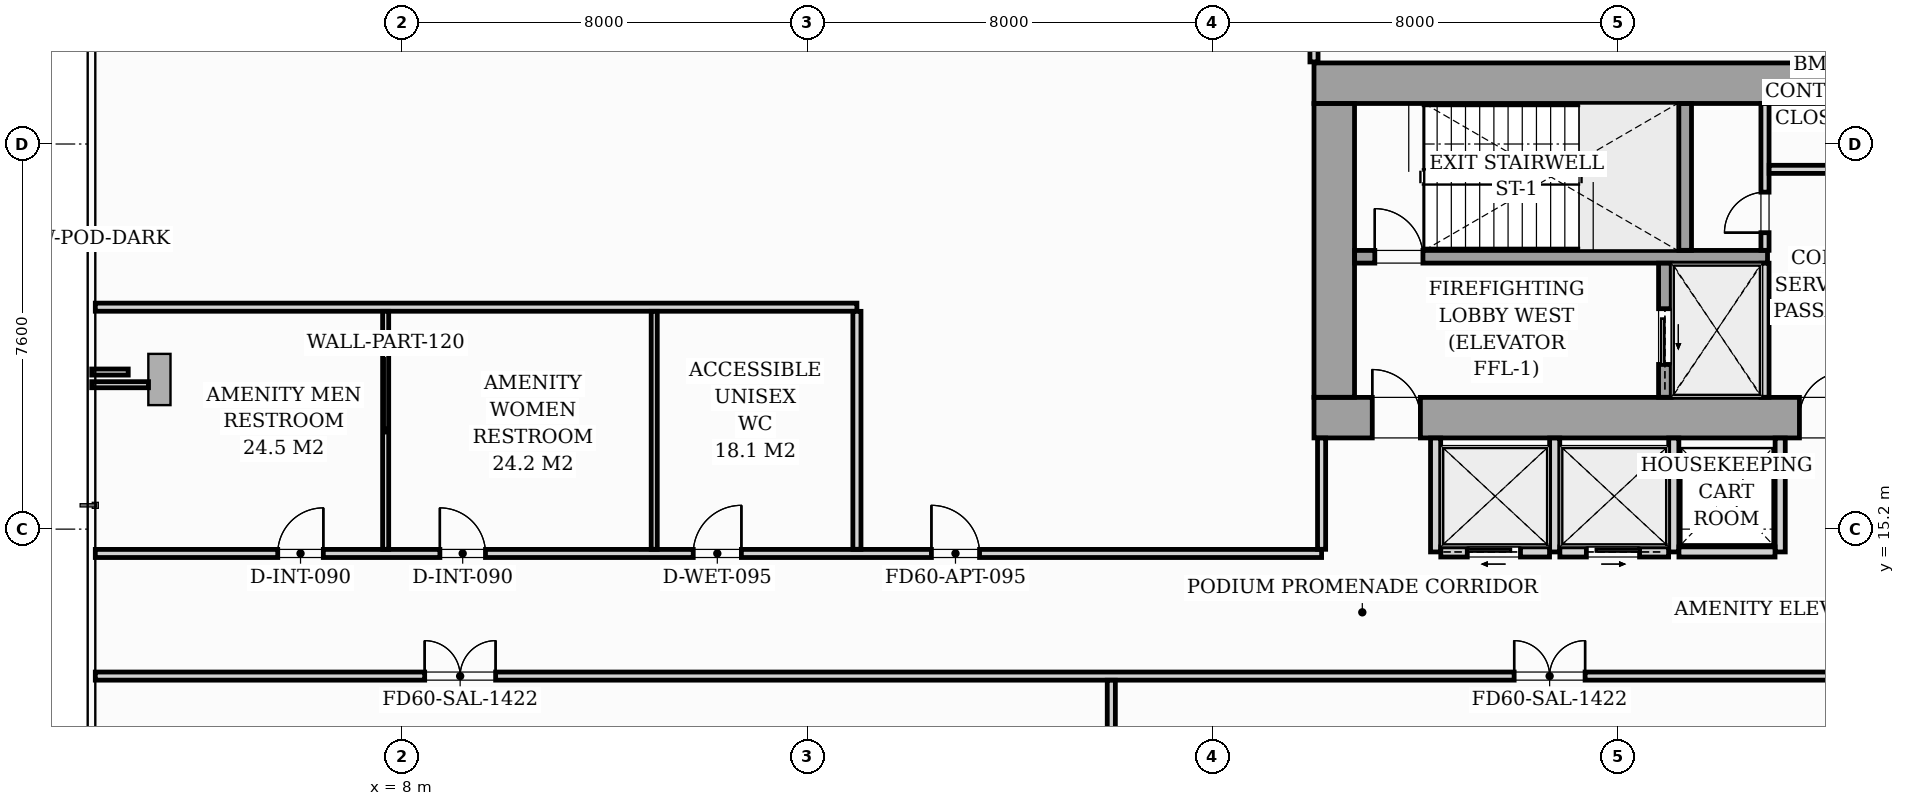
"""IFC4 building model, lengths in metres.
Left out: names, types, materials, properties, quantities, classifications, styles, units other than length and angle.
Written with IfcOpenShell. Run it as: python <this file> out.ifc"""

import sys

from ifc_helpers import new_model, si_unit, direction, frame, frame_2d, origin, origin_2d, place, context, subcontext, project, spatial, rectangle, i_section, extrude, source, transform, mapped, element, fill, save


model = new_model("IFC4")
c1 = context("Model", 3, precision=1e-05, world=origin(), true_north=direction((0.0, 1.0)))
c2 = subcontext(c1, "Body", "Model", "MODEL_VIEW")
j1 = project(units=[si_unit("LENGTHUNIT", "METRE"), si_unit("PLANEANGLEUNIT", "RADIAN")], contexts=[c1])
p1 = place(None, origin())
s1 = spatial("IfcSite", under=j1, at=p1, CompositionType="ELEMENT")
p2 = place(p1, origin())
s2 = spatial("IfcBuilding", under=s1, at=p2, CompositionType="ELEMENT")
p3 = place(p2, frame((0.0, 0.0, 5.0)))
s3 = spatial("IfcBuildingStorey", under=s2, at=p3, CompositionType="ELEMENT", Elevation=5.0)
m1 = source(origin(), c2, "Body", "SweptSolid", [
    extrude(i_section(OverallWidth=0.437, OverallDepth=0.514, WebThickness=0.061, FlangeThickness=0.097, FilletRadius=0.018, at=origin_2d()), origin(), (0.0, 0.0, 1.0), 4.496),
])
for number, where, z_axis, x_axis in (
    (1, (26.4, 17.4, 0.002), (0.0, 0.0, 1.0), (1.0, 0.0, 0.0)),
    (2, (33.12, 17.4, 0.002), (0.0, 0.0, 1.0), (1.0, 0.0, 0.0)),
    (3, (26.4, 24.0, 0.002), (0.0, 0.0, 1.0), (1.0, 0.0, 0.0)),
    (4, (33.12, 24.0, 0.002), (0.0, 0.0, 1.0), (1.0, 0.0, 0.0)),
):
    element("IfcColumn", number, at=place(p3, frame(where, z_axis=z_axis, x_axis=x_axis)), inside=s3, PredefinedType="PILASTER", context=c2, shape_type="MappedRepresentation", body=[
        mapped(m1, transform((0.0, 0.0, 0.0), scale=1.0)),
    ])
m2 = source(origin(), c2, "Body", "SweptSolid", [
    extrude(i_section(OverallWidth=0.438, OverallDepth=1.011, WebThickness=0.041, FlangeThickness=0.074, FilletRadius=0.024, at=origin_2d()), origin(), (0.0, 0.0, 1.0), 4.062),
])
p4 = place(p3, frame((2.992, 18.292, 0.061), z_axis=(0.191071642999, -0.119367185591, 0.974291076756), x_axis=(-0.826299381934, 0.516209679937, 0.225292915455)))
e5 = element("IfcColumn", 5, at=p4, inside=s3, PredefinedType="COLUMN", context=c2, shape_type="MappedRepresentation", body=[
    mapped(m2, transform((0.0, 0.0, 0.0), scale=1.0)),
])
p5 = place(p3, frame((26.0, 17.4, 0.0), z_axis=(0.0, 0.0, 1.0), x_axis=(1.0, 0.0, 0.0)))
e6 = element("IfcWall", 6, at=p5, inside=s3, PredefinedType="SHEAR", context=c2, shape_type="SweptSolid", body=[
    extrude(rectangle(XDim=20.0, YDim=0.8, at=frame_2d((10.0, 0.0))), origin(), (0.0, 0.0, 1.0), 4.5),
])
p6 = place(p5, frame((1.15, 0.0, 0.0)))
e7 = element("IfcOpeningElement", 7, at=p6, cuts=e6, PredefinedType="OPENING", context=c2, shape_type="SweptSolid", body=[
    extrude(rectangle(XDim=0.95, YDim=2.06, at=frame_2d((0.475, 1.03))), frame((0.0, 0.41, 0.0), z_axis=(0.0, -1.0, 0.0), x_axis=(1.0, 0.0, 0.0)), (0.0, 0.0, 1.0), 0.82),
])
p7 = place(p5, frame((9.58, 0.0, 0.0)))
e8 = element("IfcOpeningElement", 8, at=p7, cuts=e6, PredefinedType="OPENING", context=c2, shape_type="SweptSolid", body=[
    extrude(rectangle(XDim=0.9, YDim=2.06, at=frame_2d((0.45, 1.03))), frame((0.0, 0.41, 0.0), z_axis=(0.0, -1.0, 0.0), x_axis=(1.0, 0.0, 0.0)), (0.0, 0.0, 1.0), 0.82),
])
p8 = place(p5, frame((17.75, 0.0, 0.0)))
e9 = element("IfcOpeningElement", 9, at=p8, cuts=e6, PredefinedType="OPENING", context=c2, shape_type="SweptSolid", body=[
    extrude(rectangle(XDim=0.95, YDim=2.06, at=frame_2d((0.475, 1.03))), frame((0.0, 0.41, 0.0), z_axis=(0.0, -1.0, 0.0), x_axis=(1.0, 0.0, 0.0)), (0.0, 0.0, 1.0), 0.82),
])
p9 = place(p3, frame((26.0, 24.0, 0.0), z_axis=(0.0, 0.0, 1.0), x_axis=(1.0, 0.0, 0.0)))
e10 = element("IfcWall", 10, at=p9, inside=s3, PredefinedType="SHEAR", context=c2, shape_type="SweptSolid", body=[
    extrude(rectangle(XDim=20.0, YDim=0.8, at=frame_2d((10.0, 0.0))), origin(), (0.0, 0.0, 1.0), 4.5),
])
p10 = place(p3, frame((26.4, 17.802, 0.0), z_axis=(0.0, 0.0, 1.0), x_axis=(0.0, 1.0, 0.0)))
e11 = element("IfcWall", 11, at=p10, inside=s3, PredefinedType="SHEAR", context=c2, shape_type="SweptSolid", body=[
    extrude(rectangle(XDim=5.796, YDim=0.8, at=frame_2d((2.898, 0.0))), origin(), (0.0, 0.0, 1.0), 4.5),
])
p11 = place(p3, frame((26.802, 20.575, 0.0), z_axis=(0.0, 0.0, 1.0), x_axis=(1.0, 0.0, 0.0)))
e12 = element("IfcWall", 12, at=p11, inside=s3, PredefinedType="SOLIDWALL", context=c2, shape_type="SweptSolid", body=[
    extrude(rectangle(XDim=8.148, YDim=0.25, at=frame_2d((4.074, 0.0))), origin(), (0.0, 0.0, 1.0), 4.5),
])
p12 = place(p11, frame((0.398, 0.0, 0.0)))
e13 = element("IfcOpeningElement", 13, at=p12, cuts=e12, PredefinedType="OPENING", context=c2, shape_type="SweptSolid", body=[
    extrude(rectangle(XDim=0.95, YDim=2.06, at=frame_2d((0.475, 1.03))), frame((0.0, 0.135, 0.0), z_axis=(0.0, -1.0, 0.0), x_axis=(1.0, 0.0, 0.0)), (0.0, 0.0, 1.0), 0.27),
])
p13 = place(p3, frame((33.325, 20.702, 0.0), z_axis=(0.0, 0.0, 1.0), x_axis=(0.0, 1.0, 0.0)))
e14 = element("IfcWall", 14, at=p13, inside=s3, PredefinedType="SOLIDWALL", context=c2, shape_type="SweptSolid", body=[
    extrude(rectangle(XDim=2.896, YDim=0.25, at=frame_2d((1.448, 0.0))), origin(), (0.0, 0.0, 1.0), 4.5),
])
p14 = place(p3, frame((32.925, 17.802, 0.0), z_axis=(0.0, 0.0, 1.0), x_axis=(0.0, 1.0, 0.0)))
e15 = element("IfcWall", 15, at=p14, inside=s3, PredefinedType="SOLIDWALL", context=c2, shape_type="SweptSolid", body=[
    extrude(rectangle(XDim=2.646, YDim=0.25, at=frame_2d((1.323, 0.0))), origin(), (0.0, 0.0, 1.0), 4.5),
])
p15 = place(p14, frame((0.648, 0.0, 0.0)))
e16 = element("IfcOpeningElement", 16, at=p15, cuts=e15, PredefinedType="OPENING", context=c2, shape_type="SweptSolid", body=[
    extrude(rectangle(XDim=1.1, YDim=2.08, at=frame_2d((0.55, 1.04))), frame((0.0, 0.135, 0.0), z_axis=(0.0, -1.0, 0.0), x_axis=(1.0, 0.0, 0.0)), (0.0, 0.0, 1.0), 0.27),
])
p16 = place(p3, frame((34.9, 17.802, 0.0), z_axis=(0.0, 0.0, 1.0), x_axis=(0.0, 1.0, 0.0)))
e17 = element("IfcWall", 17, at=p16, inside=s3, PredefinedType="PARTITIONING", context=c2, shape_type="SweptSolid", body=[
    extrude(rectangle(XDim=2.646, YDim=0.16, at=frame_2d((1.323, 0.0))), origin(), (0.0, 0.0, 1.0), 4.08),
])
p17 = place(p3, frame((34.9, 20.702, 0.0), z_axis=(0.0, 0.0, 1.0), x_axis=(0.0, 1.0, 0.0)))
e18 = element("IfcWall", 18, at=p17, inside=s3, PredefinedType="PARTITIONING", context=c2, shape_type="SweptSolid", body=[
    extrude(rectangle(XDim=2.896, YDim=0.16, at=frame_2d((1.448, 0.0))), origin(), (0.0, 0.0, 1.0), 4.08),
])
p18 = place(p17, frame((0.348, 0.0, 0.0)))
e19 = element("IfcOpeningElement", 19, at=p18, cuts=e18, PredefinedType="OPENING", context=c2, shape_type="SweptSolid", body=[
    extrude(rectangle(XDim=0.8, YDim=2.05, at=frame_2d((0.4, 1.025))), frame((0.0, 0.09, 0.0), z_axis=(0.0, -1.0, 0.0), x_axis=(1.0, 0.0, 0.0)), (0.0, 0.0, 1.0), 0.18),
])
p19 = place(p3, frame((34.982, 22.3, 0.0), z_axis=(0.0, 0.0, 1.0), x_axis=(1.0, 0.0, 0.0)))
e20 = element("IfcWall", 20, at=p19, inside=s3, PredefinedType="PARTITIONING", context=c2, shape_type="SweptSolid", body=[
    extrude(rectangle(XDim=3.566, YDim=0.16, at=frame_2d((1.783, 0.0))), origin(), (0.0, 0.0, 1.0), 4.08),
])
p20 = place(p19, frame((1.378, 0.0, 0.0)))
e21 = element("IfcOpeningElement", 21, at=p20, cuts=e20, PredefinedType="OPENING", context=c2, shape_type="SweptSolid", body=[
    extrude(rectangle(XDim=0.8, YDim=2.05, at=frame_2d((0.4, 1.025))), frame((0.0, 0.09, 0.0), z_axis=(0.0, -1.0, 0.0), x_axis=(1.0, 0.0, 0.0)), (0.0, 0.0, 1.0), 0.18),
])
for number, where, z_axis, x_axis in (
    (22, (28.4, 14.75, 0.0), (0.0, 0.0, 1.0), (0.0, 1.0, 0.0)),
    (23, (30.75, 14.75, 0.0), (0.0, 0.0, 1.0), (0.0, 1.0, 0.0)),
    (24, (33.1, 14.75, 0.0), (0.0, 0.0, 1.0), (0.0, 1.0, 0.0)),
):
    element("IfcWall", number, at=place(p3, frame(where, z_axis=z_axis, x_axis=x_axis)), inside=s3, PredefinedType="PARTITIONING", context=c2, shape_type="SweptSolid", body=[
        extrude(rectangle(XDim=2.248, YDim=0.2, at=frame_2d((1.124, 0.0))), origin(), (0.0, 0.0, 1.0), 4.08),
    ])
p21 = place(p3, frame((28.502, 14.75, 0.0), z_axis=(0.0, 0.0, 1.0), x_axis=(1.0, 0.0, 0.0)))
e25 = element("IfcWall", 25, at=p21, inside=s3, PredefinedType="PARTITIONING", context=c2, shape_type="SweptSolid", body=[
    extrude(rectangle(XDim=2.146, YDim=0.2, at=frame_2d((1.073, 0.0))), origin(), (0.0, 0.0, 1.0), 4.08),
])
p22 = place(p21, frame((0.523, 0.0, 0.0)))
e26 = element("IfcOpeningElement", 26, at=p22, cuts=e25, PredefinedType="OPENING", context=c2, shape_type="SweptSolid", body=[
    extrude(rectangle(XDim=1.05, YDim=2.08, at=frame_2d((0.525, 1.04))), frame((0.0, 0.11, 0.0), z_axis=(0.0, -1.0, 0.0), x_axis=(1.0, 0.0, 0.0)), (0.0, 0.0, 1.0), 0.22),
])
p23 = place(p3, frame((30.852, 14.75, 0.0), z_axis=(0.0, 0.0, 1.0), x_axis=(1.0, 0.0, 0.0)))
e27 = element("IfcWall", 27, at=p23, inside=s3, PredefinedType="PARTITIONING", context=c2, shape_type="SweptSolid", body=[
    extrude(rectangle(XDim=2.146, YDim=0.2, at=frame_2d((1.073, 0.0))), origin(), (0.0, 0.0, 1.0), 4.08),
])
p24 = place(p23, frame((0.523, 0.0, 0.0)))
e28 = element("IfcOpeningElement", 28, at=p24, cuts=e27, PredefinedType="OPENING", context=c2, shape_type="SweptSolid", body=[
    extrude(rectangle(XDim=1.05, YDim=2.08, at=frame_2d((0.525, 1.04))), frame((0.0, 0.11, 0.0), z_axis=(0.0, -1.0, 0.0), x_axis=(1.0, 0.0, 0.0)), (0.0, 0.0, 1.0), 0.22),
])
p25 = place(p3, frame((35.2, 14.75, 0.0), z_axis=(0.0, 0.0, 1.0), x_axis=(0.0, 1.0, 0.0)))
e29 = element("IfcWall", 29, at=p25, inside=s3, PredefinedType="PARTITIONING", context=c2, shape_type="SweptSolid", body=[
    extrude(rectangle(XDim=2.248, YDim=0.2, at=frame_2d((1.124, 0.0))), origin(), (0.0, 0.0, 1.0), 4.08),
])
p26 = place(p3, frame((33.202, 14.75, 0.0), z_axis=(0.0, 0.0, 1.0), x_axis=(1.0, 0.0, 0.0)))
e30 = element("IfcWall", 30, at=p26, inside=s3, PredefinedType="PARTITIONING", context=c2, shape_type="SweptSolid", body=[
    extrude(rectangle(XDim=1.896, YDim=0.2, at=frame_2d((0.948, 0.0))), origin(), (0.0, 0.0, 1.0), 4.08),
])
p27 = place(p3, frame((1.95, 12.3, 0.0), z_axis=(0.0, 0.0, 1.0), x_axis=(1.0, 0.0, 0.0)))
e31 = element("IfcWall", 31, at=p27, inside=s3, PredefinedType="PARTITIONING", context=c2, shape_type="SweptSolid", body=[
    extrude(rectangle(XDim=76.948, YDim=0.16, at=frame_2d((38.474, 0.0))), origin(), (0.0, 0.0, 1.0), 4.08),
])
p28 = place(p27, frame((6.5, 0.0, 0.0)))
e32 = element("IfcOpeningElement", 32, at=p28, cuts=e31, PredefinedType="OPENING", context=c2, shape_type="SweptSolid", body=[
    extrude(rectangle(XDim=1.4, YDim=2.08, at=frame_2d((0.7, 1.04))), frame((0.0, 0.09, 0.0), z_axis=(0.0, -1.0, 0.0), x_axis=(1.0, 0.0, 0.0)), (0.0, 0.0, 1.0), 0.18),
])
p29 = place(p27, frame((28.0, 0.0, 0.0)))
e33 = element("IfcOpeningElement", 33, at=p29, cuts=e31, PredefinedType="OPENING", context=c2, shape_type="SweptSolid", body=[
    extrude(rectangle(XDim=1.4, YDim=2.08, at=frame_2d((0.7, 1.04))), frame((0.0, 0.09, 0.0), z_axis=(0.0, -1.0, 0.0), x_axis=(1.0, 0.0, 0.0)), (0.0, 0.0, 1.0), 0.18),
])
p30 = place(p3, frame((1.95, 14.72, 0.0), z_axis=(0.0, 0.0, 1.0), x_axis=(1.0, 0.0, 0.0)))
e34 = element("IfcWall", 34, at=p30, inside=s3, PredefinedType="PARTITIONING", context=c2, shape_type="SweptSolid", body=[
    extrude(rectangle(XDim=24.2, YDim=0.16, at=frame_2d((12.1, 0.0))), origin(), (0.0, 0.0, 1.0), 4.08),
])
p31 = place(p30, frame((16.5, 0.0, 0.0)))
e35 = element("IfcOpeningElement", 35, at=p31, cuts=e34, PredefinedType="OPENING", context=c2, shape_type="SweptSolid", body=[
    extrude(rectangle(XDim=0.95, YDim=2.06, at=frame_2d((0.475, 1.03))), frame((0.0, 0.09, 0.0), z_axis=(0.0, -1.0, 0.0), x_axis=(1.0, 0.0, 0.0)), (0.0, 0.0, 1.0), 0.18),
])
p32 = place(p30, frame((3.6, 0.0, 0.0)))
e36 = element("IfcOpeningElement", 36, at=p32, cuts=e34, PredefinedType="OPENING", context=c2, shape_type="SweptSolid", body=[
    extrude(rectangle(XDim=0.9, YDim=2.05, at=frame_2d((0.45, 1.025))), frame((0.0, 0.09, 0.0), z_axis=(0.0, -1.0, 0.0), x_axis=(1.0, 0.0, 0.0)), (0.0, 0.0, 1.0), 0.18),
])
p33 = place(p30, frame((6.8, 0.0, 0.0)))
e37 = element("IfcOpeningElement", 37, at=p33, cuts=e34, PredefinedType="OPENING", context=c2, shape_type="SweptSolid", body=[
    extrude(rectangle(XDim=0.9, YDim=2.05, at=frame_2d((0.45, 1.025))), frame((0.0, 0.09, 0.0), z_axis=(0.0, -1.0, 0.0), x_axis=(1.0, 0.0, 0.0)), (0.0, 0.0, 1.0), 0.18),
])
p34 = place(p30, frame((11.8, 0.0, 0.0)))
e38 = element("IfcOpeningElement", 38, at=p34, cuts=e34, PredefinedType="OPENING", context=c2, shape_type="SweptSolid", body=[
    extrude(rectangle(XDim=0.95, YDim=2.1, at=frame_2d((0.475, 1.05))), frame((0.0, 0.09, 0.0), z_axis=(0.0, -1.0, 0.0), x_axis=(1.0, 0.0, 0.0)), (0.0, 0.0, 1.0), 0.18),
])
p35 = place(p3, frame((22.0, 1.15, 0.0), z_axis=(0.0, 0.0, 1.0), x_axis=(0.0, 1.0, 0.0)))
e39 = element("IfcWall", 39, at=p35, inside=s3, PredefinedType="PARTITIONING", context=c2, shape_type="SweptSolid", body=[
    extrude(rectangle(XDim=11.068, YDim=0.16, at=frame_2d((5.534, 0.0))), origin(), (0.0, 0.0, 1.0), 4.08),
])
p36 = place(p3, frame((1.95, 19.58, 0.0), z_axis=(0.0, 0.0, 1.0), x_axis=(1.0, 0.0, 0.0)))
e40 = element("IfcWall", 40, at=p36, inside=s3, PredefinedType="PARTITIONING", context=c2, shape_type="SweptSolid", body=[
    extrude(rectangle(XDim=15.03, YDim=0.16, at=frame_2d((7.515, 0.0))), origin(), (0.0, 0.0, 1.0), 4.08),
])
for number, where, z_axis, x_axis in (
    (41, (7.68, 14.802, 0.0), (0.0, 0.0, 1.0), (0.0, 1.0, 0.0)),
    (42, (12.98, 14.802, 0.0), (0.0, 0.0, 1.0), (0.0, 1.0, 0.0)),
):
    element("IfcWall", number, at=place(p3, frame(where, z_axis=z_axis, x_axis=x_axis)), inside=s3, PredefinedType="PARTITIONING", context=c2, shape_type="SweptSolid", body=[
        extrude(rectangle(XDim=4.696, YDim=0.12, at=frame_2d((2.348, 0.0))), origin(), (0.0, 0.0, 1.0), 4.08),
    ])
p37 = place(p3, frame((16.98, 14.802, 0.0), z_axis=(0.0, 0.0, 1.0), x_axis=(0.0, 1.0, 0.0)))
e43 = element("IfcWall", 43, at=p37, inside=s3, PredefinedType="PARTITIONING", context=c2, shape_type="SweptSolid", body=[
    extrude(rectangle(XDim=4.696, YDim=0.16, at=frame_2d((2.348, 0.0))), origin(), (0.0, 0.0, 1.0), 4.08),
])
p38 = place(p3, frame((26.0, 24.42, 0.0), z_axis=(0.0, 0.0, 1.0), x_axis=(0.0, 1.0, 0.0)))
e44 = element("IfcWall", 44, at=p38, inside=s3, PredefinedType="PARTITIONING", context=c2, shape_type="SweptSolid", body=[
    extrude(rectangle(XDim=11.03, YDim=0.16, at=frame_2d((5.515, 0.0))), origin(), (0.0, 0.0, 1.0), 4.08),
])
p39 = place(p3, frame((26.15, 14.802, 0.0), z_axis=(0.0, 0.0, 1.0), x_axis=(0.0, 1.0, 0.0)))
e45 = element("IfcWall", 45, at=p39, inside=s3, PredefinedType="PARTITIONING", context=c2, shape_type="SweptSolid", body=[
    extrude(rectangle(XDim=2.196, YDim=0.16, at=frame_2d((1.098, 0.0))), origin(), (0.0, 0.0, 1.0), 4.08),
])
p40 = place(p3, frame((3.0, 18.05, 0.0), z_axis=(0.0, 0.0, 1.0), x_axis=(-1.0, 0.0, 0.0)))
e46 = element("IfcWall", 46, at=p40, inside=s3, PredefinedType="PARTITIONING", context=c2, shape_type="SweptSolid", body=[
    extrude(rectangle(XDim=1.12, YDim=0.12, at=frame_2d((0.56, 0.0))), origin(), (0.0, 0.0, 1.0), 4.08),
])
p41 = place(p3, frame((2.6, 18.3, 0.0), z_axis=(0.0, 0.0, 1.0), x_axis=(-1.0, 0.0, 0.0)))
e47 = element("IfcWall", 47, at=p41, inside=s3, PredefinedType="PARTITIONING", context=c2, shape_type="SweptSolid", body=[
    extrude(rectangle(XDim=0.72, YDim=0.12, at=frame_2d((0.36, 0.0))), origin(), (0.0, 0.0, 1.0), 4.08),
])
m3 = source(origin(), c2, "Body", "SweptSolid", [
    extrude(rectangle(XDim=0.95, YDim=2.06, at=frame_2d((0.475, 1.03))), frame((0.0, 0.025, 0.0), z_axis=(0.0, -1.0, 0.0), x_axis=(1.0, 0.0, 0.0)), (0.0, 0.0, 1.0), 0.05),
])
p42 = place(p6, origin())
e48 = element("IfcDoor", 48, at=p42, inside=s3, OperationType="SINGLE_SWING_LEFT", PredefinedType="DOOR", context=c2, shape_type="MappedRepresentation", body=[
    mapped(m3, transform((0.0, 0.0, 0.0), scale=1.0)),
])
fill(e7, e48)
m4 = source(origin(), c2, "Body", "SweptSolid", [
    extrude(rectangle(XDim=0.9, YDim=2.06, at=frame_2d((0.45, 1.03))), frame((0.0, 0.025, 0.0), z_axis=(0.0, -1.0, 0.0), x_axis=(1.0, 0.0, 0.0)), (0.0, 0.0, 1.0), 0.05),
])
p43 = place(p7, origin())
e49 = element("IfcDoor", 49, at=p43, inside=s3, OperationType="SINGLE_SWING_RIGHT", PredefinedType="DOOR", context=c2, shape_type="MappedRepresentation", body=[
    mapped(m4, transform((0.0, 0.0, 0.0), scale=1.0)),
])
fill(e8, e49)
p44 = place(p12, origin())
e50 = element("IfcDoor", 50, at=p44, inside=s3, OperationType="SINGLE_SWING_LEFT", PredefinedType="DOOR", context=c2, shape_type="MappedRepresentation", body=[
    mapped(m3, transform((0.0, 0.0, 0.0), scale=1.0)),
])
fill(e13, e50)
m5 = source(origin(), c2, "Body", "SweptSolid", [
    extrude(rectangle(XDim=1.1, YDim=2.08, at=frame_2d((0.55, 1.04))), frame((0.0, 0.025, 0.0), z_axis=(0.0, -1.0, 0.0), x_axis=(1.0, 0.0, 0.0)), (0.0, 0.0, 1.0), 0.05),
])
p45 = place(p15, origin())
e51 = element("IfcDoor", 51, at=p45, inside=s3, OperationType="SLIDING_TO_LEFT", PredefinedType="DOOR", context=c2, shape_type="MappedRepresentation", body=[
    mapped(m5, transform((0.0, 0.0, 0.0), scale=1.0)),
])
fill(e16, e51)
m6 = source(origin(), c2, "Body", "SweptSolid", [
    extrude(rectangle(XDim=0.8, YDim=2.05, at=frame_2d((0.4, 1.025))), frame((0.0, 0.025, 0.0), z_axis=(0.0, -1.0, 0.0), x_axis=(1.0, 0.0, 0.0)), (0.0, 0.0, 1.0), 0.05),
])
p46 = place(p18, origin())
e52 = element("IfcDoor", 52, at=p46, inside=s3, OperationType="SINGLE_SWING_LEFT", PredefinedType="DOOR", context=c2, shape_type="MappedRepresentation", body=[
    mapped(m6, transform((0.0, 0.0, 0.0), scale=1.0)),
])
fill(e19, e52)
m7 = source(origin(), c2, "Body", "SweptSolid", [
    extrude(rectangle(XDim=1.05, YDim=2.08, at=frame_2d((0.525, 1.04))), frame((0.0, 0.025, 0.0), z_axis=(0.0, -1.0, 0.0), x_axis=(1.0, 0.0, 0.0)), (0.0, 0.0, 1.0), 0.05),
])
p47 = place(p22, origin())
e53 = element("IfcDoor", 53, at=p47, inside=s3, OperationType="SLIDING_TO_LEFT", PredefinedType="DOOR", context=c2, shape_type="MappedRepresentation", body=[
    mapped(m7, transform((0.0, 0.0, 0.0), scale=1.0)),
])
fill(e26, e53)
p48 = place(p24, origin())
e54 = element("IfcDoor", 54, at=p48, inside=s3, OperationType="SLIDING_TO_RIGHT", PredefinedType="DOOR", context=c2, shape_type="MappedRepresentation", body=[
    mapped(m7, transform((0.0, 0.0, 0.0), scale=1.0)),
])
fill(e28, e54)
m8 = source(origin(), c2, "Body", "SweptSolid", [
    extrude(rectangle(XDim=1.4, YDim=2.08, at=frame_2d((0.7, 1.04))), frame((0.0, 0.025, 0.0), z_axis=(0.0, -1.0, 0.0), x_axis=(1.0, 0.0, 0.0)), (0.0, 0.0, 1.0), 0.05),
])
p49 = place(p28, origin())
e55 = element("IfcDoor", 55, at=p49, inside=s3, OperationType="DOUBLE_DOOR_SINGLE_SWING", PredefinedType="DOOR", context=c2, shape_type="MappedRepresentation", body=[
    mapped(m8, transform((0.0, 0.0, 0.0), scale=1.0)),
])
fill(e32, e55)
p50 = place(p29, origin())
e56 = element("IfcDoor", 56, at=p50, inside=s3, OperationType="DOUBLE_DOOR_SINGLE_SWING", PredefinedType="DOOR", context=c2, shape_type="MappedRepresentation", body=[
    mapped(m8, transform((0.0, 0.0, 0.0), scale=1.0)),
])
fill(e33, e56)
m9 = source(origin(), c2, "Body", "SweptSolid", [
    extrude(rectangle(XDim=0.95, YDim=2.06, at=frame_2d((0.475, 1.03))), frame((0.0, 0.025, 0.0), z_axis=(0.0, -1.0, 0.0), x_axis=(1.0, 0.0, 0.0)), (0.0, 0.0, 1.0), 0.05),
])
p51 = place(p31, origin())
e57 = element("IfcDoor", 57, at=p51, inside=s3, OperationType="SINGLE_SWING_LEFT", PredefinedType="DOOR", context=c2, shape_type="MappedRepresentation", body=[
    mapped(m9, transform((0.0, 0.0, 0.0), scale=1.0)),
])
fill(e35, e57)
m10 = source(origin(), c2, "Body", "SweptSolid", [
    extrude(rectangle(XDim=0.9, YDim=2.05, at=frame_2d((0.45, 1.025))), frame((0.0, 0.025, 0.0), z_axis=(0.0, -1.0, 0.0), x_axis=(1.0, 0.0, 0.0)), (0.0, 0.0, 1.0), 0.05),
])
p52 = place(p32, origin())
e58 = element("IfcDoor", 58, at=p52, inside=s3, OperationType="SINGLE_SWING_RIGHT", PredefinedType="DOOR", context=c2, shape_type="MappedRepresentation", body=[
    mapped(m10, transform((0.0, 0.0, 0.0), scale=1.0)),
])
fill(e36, e58)
p53 = place(p33, origin())
e59 = element("IfcDoor", 59, at=p53, inside=s3, OperationType="SINGLE_SWING_LEFT", PredefinedType="DOOR", context=c2, shape_type="MappedRepresentation", body=[
    mapped(m10, transform((0.0, 0.0, 0.0), scale=1.0)),
])
fill(e37, e59)
m11 = source(origin(), c2, "Body", "SweptSolid", [
    extrude(rectangle(XDim=0.95, YDim=2.1, at=frame_2d((0.475, 1.05))), frame((0.0, 0.025, 0.0), z_axis=(0.0, -1.0, 0.0), x_axis=(1.0, 0.0, 0.0)), (0.0, 0.0, 1.0), 0.05),
])
p54 = place(p34, origin())
e60 = element("IfcDoor", 60, at=p54, inside=s3, OperationType="SINGLE_SWING_RIGHT", PredefinedType="DOOR", context=c2, shape_type="MappedRepresentation", body=[
    mapped(m11, transform((0.0, 0.0, 0.0), scale=1.0)),
])
fill(e38, e60)
save(model, sys.argv[1])
